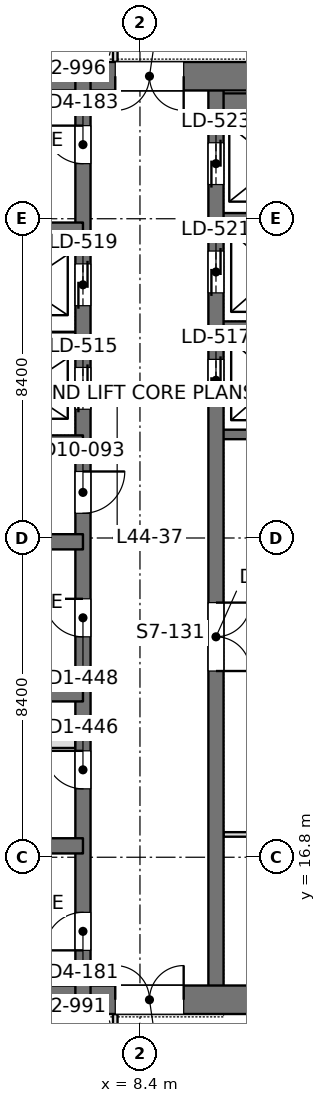
"""IFC4 building model, lengths in metres.
Left out: names, types, materials, properties, quantities, classifications, styles, units other than length and angle.
Written with IfcOpenShell. Run it as: python <this file> out.ifc"""

import sys

from ifc_helpers import new_model, si_unit, direction, frame, frame_2d, origin, place, context, subcontext, project, spatial, rectangle, extrude, element, fill, save


model = new_model("IFC4")
c1 = context("Model", 3, precision=1e-05, world=origin(), true_north=direction((0.0, 1.0)))
c2 = subcontext(c1, "Body", "Model", "MODEL_VIEW")
j1 = project(units=[si_unit("LENGTHUNIT", "METRE"), si_unit("PLANEANGLEUNIT", "RADIAN")], contexts=[c1])
p1 = place(None, origin())
s1 = spatial("IfcSite", under=j1, at=p1, CompositionType="ELEMENT")
p2 = place(p1, origin())
s2 = spatial("IfcBuilding", under=s1, at=p2, CompositionType="ELEMENT")
p3 = place(p2, frame((0.0, 0.0, 194.4)))
s3 = spatial("IfcBuildingStorey", under=s2, at=p3, CompositionType="ELEMENT", Elevation=194.4)
p4 = place(p3, frame((-1.125, 13.05, 0.0), z_axis=(0.0, 0.0, 1.0), x_axis=(1.0, 0.0, 0.0)))
e1 = element("IfcWall", 1, at=p4, inside=s3, PredefinedType="SHEAR", context=c2, shape_type="SweptSolid", body=[
    extrude(rectangle(XDim=17.85, YDim=0.75, at=frame_2d((8.925, 0.0))), origin(), (0.0, 0.0, 1.0), 4.2),
])
p5 = place(p4, frame((8.875, 0.0, 0.0)))
e2 = element("IfcOpeningElement", 2, at=p5, cuts=e1, PredefinedType="OPENING", context=c2, shape_type="SweptSolid", body=[
    extrude(rectangle(XDim=1.8, YDim=2.4, at=frame_2d((0.9, 1.2))), frame((0.0, 0.385, 0.0), z_axis=(0.0, -1.0, 0.0), x_axis=(1.0, 0.0, 0.0)), (0.0, 0.0, 1.0), 0.77),
])
p6 = place(p3, frame((-1.125, 37.35, 0.0), z_axis=(0.0, 0.0, 1.0), x_axis=(1.0, 0.0, 0.0)))
e3 = element("IfcWall", 3, at=p6, inside=s3, PredefinedType="SHEAR", context=c2, shape_type="SweptSolid", body=[
    extrude(rectangle(XDim=17.85, YDim=0.75, at=frame_2d((8.925, 0.0))), origin(), (0.0, 0.0, 1.0), 4.2),
])
p7 = place(p6, frame((8.875, 0.0, 0.0)))
e4 = element("IfcOpeningElement", 4, at=p7, cuts=e3, PredefinedType="OPENING", context=c2, shape_type="SweptSolid", body=[
    extrude(rectangle(XDim=1.8, YDim=2.4, at=frame_2d((0.9, 1.2))), frame((0.0, 0.385, 0.0), z_axis=(0.0, -1.0, 0.0), x_axis=(1.0, 0.0, 0.0)), (0.0, 0.0, 1.0), 0.77),
])
p8 = place(p3, frame((6.9, 13.05, 0.0), z_axis=(0.0, 0.0, 1.0), x_axis=(0.0, 1.0, 0.0)))
e5 = element("IfcWall", 5, at=p8, inside=s3, PredefinedType="SHEAR", context=c2, shape_type="SweptSolid", body=[
    extrude(rectangle(XDim=24.3, YDim=0.4, at=frame_2d((12.15, 0.0))), origin(), (0.0, 0.0, 1.0), 4.2),
])
p9 = place(p8, frame((1.3, 0.0, 0.0)))
e6 = element("IfcOpeningElement", 6, at=p9, cuts=e5, PredefinedType="OPENING", context=c2, shape_type="SweptSolid", body=[
    extrude(rectangle(XDim=1.0, YDim=2.2, at=frame_2d((0.5, 1.1))), frame((0.0, 0.21, 0.0), z_axis=(0.0, -1.0, 0.0), x_axis=(1.0, 0.0, 0.0)), (0.0, 0.0, 1.0), 0.42),
])
p10 = place(p8, frame((22.0, 0.0, 0.0)))
e7 = element("IfcOpeningElement", 7, at=p10, cuts=e5, PredefinedType="OPENING", context=c2, shape_type="SweptSolid", body=[
    extrude(rectangle(XDim=1.0, YDim=2.2, at=frame_2d((0.5, 1.1))), frame((0.0, 0.21, 0.0), z_axis=(0.0, -1.0, 0.0), x_axis=(1.0, 0.0, 0.0)), (0.0, 0.0, 1.0), 0.42),
])
p11 = place(p8, frame((5.55, 0.0, 0.0)))
e8 = element("IfcOpeningElement", 8, at=p11, cuts=e5, PredefinedType="OPENING", context=c2, shape_type="SweptSolid", body=[
    extrude(rectangle(XDim=1.0, YDim=2.2, at=frame_2d((0.5, 1.1))), frame((0.0, 0.21, 0.0), z_axis=(0.0, -1.0, 0.0), x_axis=(1.0, 0.0, 0.0)), (0.0, 0.0, 1.0), 0.42),
])
p12 = place(p8, frame((9.55, 0.0, 0.0)))
e9 = element("IfcOpeningElement", 9, at=p12, cuts=e5, PredefinedType="OPENING", context=c2, shape_type="SweptSolid", body=[
    extrude(rectangle(XDim=1.0, YDim=2.2, at=frame_2d((0.5, 1.1))), frame((0.0, 0.21, 0.0), z_axis=(0.0, -1.0, 0.0), x_axis=(1.0, 0.0, 0.0)), (0.0, 0.0, 1.0), 0.42),
])
p13 = place(p8, frame((12.8, 0.0, 0.0)))
e10 = element("IfcOpeningElement", 10, at=p13, cuts=e5, PredefinedType="OPENING", context=c2, shape_type="SweptSolid", body=[
    extrude(rectangle(XDim=1.1, YDim=2.2, at=frame_2d((0.55, 1.1))), frame((0.0, 0.21, 0.0), z_axis=(0.0, -1.0, 0.0), x_axis=(1.0, 0.0, 0.0)), (0.0, 0.0, 1.0), 0.42),
])
p14 = place(p8, frame((15.538, 0.0, 0.0)))
e11 = element("IfcOpeningElement", 11, at=p14, cuts=e5, PredefinedType="OPENING", context=c2, shape_type="SweptSolid", body=[
    extrude(rectangle(XDim=1.1, YDim=2.2, at=frame_2d((0.55, 1.1))), frame((0.0, 0.21, 0.0), z_axis=(0.0, -1.0, 0.0), x_axis=(1.0, 0.0, 0.0)), (0.0, 0.0, 1.0), 0.42),
])
p15 = place(p8, frame((18.262, 0.0, 0.0)))
e12 = element("IfcOpeningElement", 12, at=p15, cuts=e5, PredefinedType="OPENING", context=c2, shape_type="SweptSolid", body=[
    extrude(rectangle(XDim=1.1, YDim=2.2, at=frame_2d((0.55, 1.1))), frame((0.0, 0.21, 0.0), z_axis=(0.0, -1.0, 0.0), x_axis=(1.0, 0.0, 0.0)), (0.0, 0.0, 1.0), 0.42),
])
p16 = place(p3, frame((10.4, 13.05, 0.0), z_axis=(0.0, 0.0, 1.0), x_axis=(0.0, 1.0, 0.0)))
e13 = element("IfcWall", 13, at=p16, inside=s3, PredefinedType="SHEAR", context=c2, shape_type="SweptSolid", body=[
    extrude(rectangle(XDim=24.3, YDim=0.4, at=frame_2d((12.15, 0.0))), origin(), (0.0, 0.0, 1.0), 4.2),
])
p17 = place(p16, frame((15.75, 0.0, 0.0)))
e14 = element("IfcOpeningElement", 14, at=p17, cuts=e13, PredefinedType="OPENING", context=c2, shape_type="SweptSolid", body=[
    extrude(rectangle(XDim=1.1, YDim=2.2, at=frame_2d((0.55, 1.1))), frame((0.0, 0.21, 0.0), z_axis=(0.0, -1.0, 0.0), x_axis=(1.0, 0.0, 0.0)), (0.0, 0.0, 1.0), 0.42),
])
p18 = place(p16, frame((18.6, 0.0, 0.0)))
e15 = element("IfcOpeningElement", 15, at=p18, cuts=e13, PredefinedType="OPENING", context=c2, shape_type="SweptSolid", body=[
    extrude(rectangle(XDim=1.1, YDim=2.2, at=frame_2d((0.55, 1.1))), frame((0.0, 0.21, 0.0), z_axis=(0.0, -1.0, 0.0), x_axis=(1.0, 0.0, 0.0)), (0.0, 0.0, 1.0), 0.42),
])
p19 = place(p16, frame((21.45, 0.0, 0.0)))
e16 = element("IfcOpeningElement", 16, at=p19, cuts=e13, PredefinedType="OPENING", context=c2, shape_type="SweptSolid", body=[
    extrude(rectangle(XDim=1.1, YDim=2.2, at=frame_2d((0.55, 1.1))), frame((0.0, 0.21, 0.0), z_axis=(0.0, -1.0, 0.0), x_axis=(1.0, 0.0, 0.0)), (0.0, 0.0, 1.0), 0.42),
])
p20 = place(p16, frame((8.65, 0.0, 0.0)))
e17 = element("IfcOpeningElement", 17, at=p20, cuts=e13, PredefinedType="OPENING", context=c2, shape_type="SweptSolid", body=[
    extrude(rectangle(XDim=1.8, YDim=2.4, at=frame_2d((0.9, 1.2))), frame((0.0, 0.21, 0.0), z_axis=(0.0, -1.0, 0.0), x_axis=(1.0, 0.0, 0.0)), (0.0, 0.0, 1.0), 0.42),
])
for number, where, z_axis, x_axis in (
    (18, (-0.75, 17.1, 0.0), (0.0, 0.0, 1.0), (1.0, 0.0, 0.0)),
    (19, (-0.75, 21.1, 0.0), (0.0, 0.0, 1.0), (1.0, 0.0, 0.0)),
    (20, (-0.75, 25.1, 0.0), (0.0, 0.0, 1.0), (1.0, 0.0, 0.0)),
    (21, (-0.75, 27.7, 0.0), (0.0, 0.0, 1.0), (1.0, 0.0, 0.0)),
    (22, (-0.75, 33.3, 0.0), (0.0, 0.0, 1.0), (1.0, 0.0, 0.0)),
):
    element("IfcWall", number, at=place(p3, frame(where, z_axis=z_axis, x_axis=x_axis)), inside=s3, PredefinedType="SHEAR", context=c2, shape_type="SweptSolid", body=[
        extrude(rectangle(XDim=7.65, YDim=0.4, at=frame_2d((3.825, 0.0))), origin(), (0.0, 0.0, 1.0), 4.2),
    ])
p21 = place(p3, frame((3.7, 30.5, 0.0), z_axis=(0.0, 0.0, 1.0), x_axis=(1.0, 0.0, 0.0)))
e23 = element("IfcWall", 23, at=p21, inside=s3, PredefinedType="SHEAR", context=c2, shape_type="SweptSolid", body=[
    extrude(rectangle(XDim=3.2, YDim=0.25, at=frame_2d((1.6, 0.0))), origin(), (0.0, 0.0, 1.0), 4.2),
])
p22 = place(p3, frame((10.4, 27.925, 0.0), z_axis=(0.0, 0.0, 1.0), x_axis=(1.0, 0.0, 0.0)))
e24 = element("IfcWall", 24, at=p22, inside=s3, PredefinedType="SHEAR", context=c2, shape_type="SweptSolid", body=[
    extrude(rectangle(XDim=5.95, YDim=0.25, at=frame_2d((2.975, 0.0))), origin(), (0.0, 0.0, 1.0), 4.2),
])
for number, where, z_axis, x_axis in (
    (25, (10.4, 30.775, 0.0), (0.0, 0.0, 1.0), (1.0, 0.0, 0.0)),
    (26, (10.4, 33.625, 0.0), (0.0, 0.0, 1.0), (1.0, 0.0, 0.0)),
):
    element("IfcWall", number, at=place(p3, frame(where, z_axis=z_axis, x_axis=x_axis)), inside=s3, PredefinedType="SHEAR", context=c2, shape_type="SweptSolid", body=[
        extrude(rectangle(XDim=3.2, YDim=0.25, at=frame_2d((1.6, 0.0))), origin(), (0.0, 0.0, 1.0), 4.2),
    ])
p23 = place(p3, frame((10.4, 36.625, 0.0), z_axis=(0.0, 0.0, 1.0), x_axis=(1.0, 0.0, 0.0)))
e27 = element("IfcWall", 27, at=p23, inside=s3, PredefinedType="SHEAR", context=c2, shape_type="SweptSolid", body=[
    extrude(rectangle(XDim=3.2, YDim=0.55, at=frame_2d((1.6, 0.0))), origin(), (0.0, 0.0, 1.0), 4.2),
])
p24 = place(p3, frame((10.598, 17.4, 0.0), z_axis=(0.0, 0.0, 1.0), x_axis=(1.0, 0.0, 0.0)))
e28 = element("IfcWall", 28, at=p24, inside=s3, PredefinedType="PARTITIONING", context=c2, shape_type="SweptSolid", body=[
    extrude(rectangle(XDim=5.904, YDim=0.12, at=frame_2d((2.952, 0.0))), origin(), (0.0, 0.0, 1.0), 3.55),
])
p25 = place(p3, frame((7.75, 10.758, 0.0), z_axis=(0.0, 0.0, 1.0), x_axis=(0.0, 1.0, 0.0)))
e29 = element("IfcWall", 29, at=p25, inside=s3, PredefinedType="PARTITIONING", context=c2, shape_type="SweptSolid", body=[
    extrude(rectangle(XDim=1.918, YDim=0.12, at=frame_2d((0.959, 0.0))), origin(), (0.0, 0.0, 1.0), 4.05),
])
p26 = place(p25, frame((0.392, 0.0, 0.0)))
e30 = element("IfcOpeningElement", 30, at=p26, cuts=e29, PredefinedType="OPENING", context=c2, shape_type="SweptSolid", body=[
    extrude(rectangle(XDim=1.0, YDim=2.4, at=frame_2d((0.5, 1.2))), frame((0.0, 0.07, 0.0), z_axis=(0.0, -1.0, 0.0), x_axis=(1.0, 0.0, 0.0)), (0.0, 0.0, 1.0), 0.14),
])
p27 = place(p3, frame((7.75, 37.724, 0.0), z_axis=(0.0, 0.0, 1.0), x_axis=(0.0, 1.0, 0.0)))
e31 = element("IfcWall", 31, at=p27, inside=s3, PredefinedType="PARTITIONING", context=c2, shape_type="SweptSolid", body=[
    extrude(rectangle(XDim=1.918, YDim=0.12, at=frame_2d((0.959, 0.0))), origin(), (0.0, 0.0, 1.0), 4.05),
])
p28 = place(p27, frame((0.526, 0.0, 0.0)))
e32 = element("IfcOpeningElement", 32, at=p28, cuts=e31, PredefinedType="OPENING", context=c2, shape_type="SweptSolid", body=[
    extrude(rectangle(XDim=1.0, YDim=2.4, at=frame_2d((0.5, 1.2))), frame((0.0, 0.07, 0.0), z_axis=(0.0, -1.0, 0.0), x_axis=(1.0, 0.0, 0.0)), (0.0, 0.0, 1.0), 0.14),
])
p29 = place(p3, frame((0.025, 19.8, 0.0), z_axis=(0.0, 0.0, 1.0), x_axis=(1.0, 0.0, 0.0)))
e33 = element("IfcWall", 33, at=p29, inside=s3, PredefinedType="PARTITIONING", context=c2, shape_type="SweptSolid", body=[
    extrude(rectangle(XDim=6.675, YDim=0.25, at=frame_2d((3.337, 0.0))), origin(), (0.0, 0.0, 1.0), 4.0),
])
p30 = place(p29, frame((2.913, 0.0, 0.0)))
e34 = element("IfcOpeningElement", 34, at=p30, cuts=e33, PredefinedType="OPENING", context=c2, shape_type="SweptSolid", body=[
    extrude(rectangle(XDim=0.9, YDim=2.2, at=frame_2d((0.45, 1.1))), frame((0.0, 0.135, 0.0), z_axis=(0.0, -1.0, 0.0), x_axis=(1.0, 0.0, 0.0)), (0.0, 0.0, 1.0), 0.27),
])
p31 = place(p5, origin())
e35 = element("IfcDoor", 35, at=p31, inside=s3, OperationType="DOUBLE_DOOR_SINGLE_SWING", PredefinedType="DOOR", context=c2, shape_type="SweptSolid", body=[
    extrude(rectangle(XDim=1.8, YDim=2.4, at=frame_2d((0.9, 1.2))), frame((0.0, 0.025, 0.0), z_axis=(0.0, -1.0, 0.0), x_axis=(1.0, 0.0, 0.0)), (0.0, 0.0, 1.0), 0.05),
])
fill(e2, e35)
p32 = place(p7, frame((1.8, 0.0, 0.0), z_axis=(0.0, 0.0, 1.0), x_axis=(-1.0, 0.0, 0.0)))
e36 = element("IfcDoor", 36, at=p32, inside=s3, OperationType="DOUBLE_DOOR_SINGLE_SWING", PredefinedType="DOOR", context=c2, shape_type="SweptSolid", body=[
    extrude(rectangle(XDim=1.8, YDim=2.4, at=frame_2d((0.9, 1.2))), frame((0.0, 0.025, 0.0), z_axis=(0.0, -1.0, 0.0), x_axis=(1.0, 0.0, 0.0)), (0.0, 0.0, 1.0), 0.05),
])
fill(e4, e36)
p33 = place(p9, origin())
e37 = element("IfcDoor", 37, at=p33, inside=s3, OperationType="SINGLE_SWING_LEFT", PredefinedType="DOOR", context=c2, shape_type="SweptSolid", body=[
    extrude(rectangle(XDim=1.0, YDim=2.2, at=frame_2d((0.5, 1.1))), frame((0.0, 0.025, 0.0), z_axis=(0.0, -1.0, 0.0), x_axis=(1.0, 0.0, 0.0)), (0.0, 0.0, 1.0), 0.05),
])
fill(e6, e37)
p34 = place(p10, origin())
e38 = element("IfcDoor", 38, at=p34, inside=s3, OperationType="SINGLE_SWING_RIGHT", PredefinedType="DOOR", context=c2, shape_type="SweptSolid", body=[
    extrude(rectangle(XDim=1.0, YDim=2.2, at=frame_2d((0.5, 1.1))), frame((0.0, 0.025, 0.0), z_axis=(0.0, -1.0, 0.0), x_axis=(1.0, 0.0, 0.0)), (0.0, 0.0, 1.0), 0.05),
])
fill(e7, e38)
p35 = place(p11, origin())
e39 = element("IfcDoor", 39, at=p35, inside=s3, OperationType="SINGLE_SWING_RIGHT", PredefinedType="DOOR", context=c2, shape_type="SweptSolid", body=[
    extrude(rectangle(XDim=1.0, YDim=2.2, at=frame_2d((0.5, 1.1))), frame((0.0, 0.025, 0.0), z_axis=(0.0, -1.0, 0.0), x_axis=(1.0, 0.0, 0.0)), (0.0, 0.0, 1.0), 0.05),
])
fill(e8, e39)
p36 = place(p12, origin())
e40 = element("IfcDoor", 40, at=p36, inside=s3, OperationType="SINGLE_SWING_RIGHT", PredefinedType="DOOR", context=c2, shape_type="SweptSolid", body=[
    extrude(rectangle(XDim=1.0, YDim=2.2, at=frame_2d((0.5, 1.1))), frame((0.0, 0.025, 0.0), z_axis=(0.0, -1.0, 0.0), x_axis=(1.0, 0.0, 0.0)), (0.0, 0.0, 1.0), 0.05),
])
fill(e9, e40)
p37 = place(p13, frame((1.1, 0.0, 0.0), z_axis=(0.0, 0.0, 1.0), x_axis=(-1.0, 0.0, 0.0)))
e41 = element("IfcDoor", 41, at=p37, inside=s3, OperationType="SINGLE_SWING_LEFT", PredefinedType="DOOR", context=c2, shape_type="SweptSolid", body=[
    extrude(rectangle(XDim=1.1, YDim=2.2, at=frame_2d((0.55, 1.1))), frame((0.0, 0.025, 0.0), z_axis=(0.0, -1.0, 0.0), x_axis=(1.0, 0.0, 0.0)), (0.0, 0.0, 1.0), 0.05),
])
fill(e10, e41)
p38 = place(p17, origin())
e42 = element("IfcDoor", 42, at=p38, inside=s3, OperationType="DOUBLE_DOOR_SLIDING", PredefinedType="DOOR", context=c2, shape_type="SweptSolid", body=[
    extrude(rectangle(XDim=1.1, YDim=2.2, at=frame_2d((0.55, 1.1))), frame((0.0, 0.025, 0.0), z_axis=(0.0, -1.0, 0.0), x_axis=(1.0, 0.0, 0.0)), (0.0, 0.0, 1.0), 0.05),
])
fill(e14, e42)
p39 = place(p18, origin())
e43 = element("IfcDoor", 43, at=p39, inside=s3, OperationType="DOUBLE_DOOR_SLIDING", PredefinedType="DOOR", context=c2, shape_type="SweptSolid", body=[
    extrude(rectangle(XDim=1.1, YDim=2.2, at=frame_2d((0.55, 1.1))), frame((0.0, 0.025, 0.0), z_axis=(0.0, -1.0, 0.0), x_axis=(1.0, 0.0, 0.0)), (0.0, 0.0, 1.0), 0.05),
])
fill(e15, e43)
p40 = place(p19, origin())
e44 = element("IfcDoor", 44, at=p40, inside=s3, OperationType="DOUBLE_DOOR_SLIDING", PredefinedType="DOOR", context=c2, shape_type="SweptSolid", body=[
    extrude(rectangle(XDim=1.1, YDim=2.2, at=frame_2d((0.55, 1.1))), frame((0.0, 0.025, 0.0), z_axis=(0.0, -1.0, 0.0), x_axis=(1.0, 0.0, 0.0)), (0.0, 0.0, 1.0), 0.05),
])
fill(e16, e44)
p41 = place(p14, origin())
e45 = element("IfcDoor", 45, at=p41, inside=s3, OperationType="DOUBLE_DOOR_SLIDING", PredefinedType="DOOR", context=c2, shape_type="SweptSolid", body=[
    extrude(rectangle(XDim=1.1, YDim=2.2, at=frame_2d((0.55, 1.1))), frame((0.0, 0.025, 0.0), z_axis=(0.0, -1.0, 0.0), x_axis=(1.0, 0.0, 0.0)), (0.0, 0.0, 1.0), 0.05),
])
fill(e11, e45)
p42 = place(p15, origin())
e46 = element("IfcDoor", 46, at=p42, inside=s3, OperationType="DOUBLE_DOOR_SLIDING", PredefinedType="DOOR", context=c2, shape_type="SweptSolid", body=[
    extrude(rectangle(XDim=1.1, YDim=2.2, at=frame_2d((0.55, 1.1))), frame((0.0, 0.025, 0.0), z_axis=(0.0, -1.0, 0.0), x_axis=(1.0, 0.0, 0.0)), (0.0, 0.0, 1.0), 0.05),
])
fill(e12, e46)
p43 = place(p20, frame((1.8, 0.0, 0.0), z_axis=(0.0, 0.0, 1.0), x_axis=(-1.0, 0.0, 0.0)))
e47 = element("IfcDoor", 47, at=p43, inside=s3, OperationType="DOUBLE_DOOR_SINGLE_SWING", PredefinedType="DOOR", context=c2, shape_type="SweptSolid", body=[
    extrude(rectangle(XDim=1.8, YDim=2.4, at=frame_2d((0.9, 1.2))), frame((0.0, 0.025, 0.0), z_axis=(0.0, -1.0, 0.0), x_axis=(1.0, 0.0, 0.0)), (0.0, 0.0, 1.0), 0.05),
])
fill(e17, e47)
save(model, sys.argv[1])
